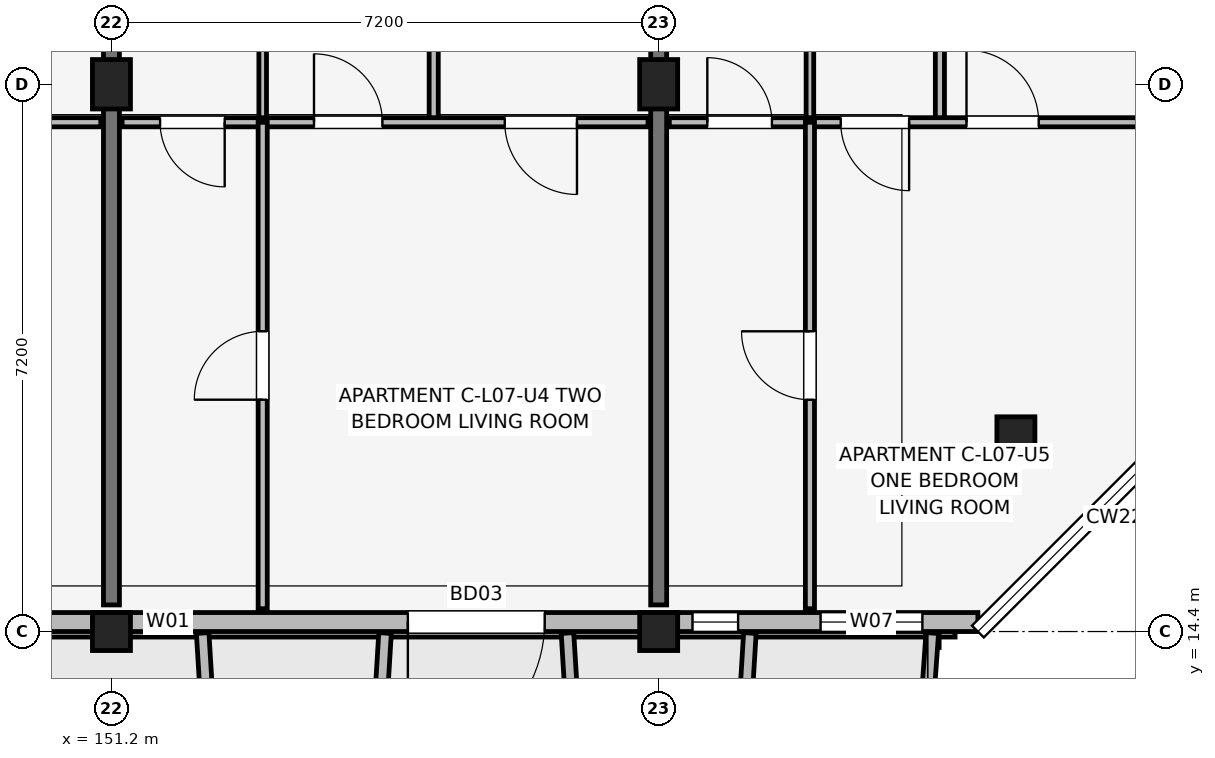
"""IFC4 building model, lengths in metres.
Left out: names, types, materials, properties, quantities, classifications, styles, units other than length and angle.
Written with IfcOpenShell. Run it as: python <this file> out.ifc"""

import sys

from ifc_helpers import new_model, si_unit, direction, frame, frame_2d, origin, origin_2d, place, context, subcontext, project, spatial, rectangle, extrude, element, fill, save


model = new_model("IFC4")
c1 = context("Model", 3, precision=1e-05, world=origin(), true_north=direction((0.0, 1.0)))
c2 = subcontext(c1, "Body", "Model", "MODEL_VIEW")
j1 = project(units=[si_unit("LENGTHUNIT", "METRE"), si_unit("PLANEANGLEUNIT", "RADIAN")], contexts=[c1])
p1 = place(None, origin())
s1 = spatial("IfcSite", under=j1, at=p1, CompositionType="ELEMENT")
p2 = place(p1, origin())
s2 = spatial("IfcBuilding", under=s1, at=p2, CompositionType="ELEMENT")
p3 = place(p2, frame((0.0, 0.0, 24.45)))
s3 = spatial("IfcBuildingStorey", under=s2, at=p3, CompositionType="ELEMENT", Elevation=24.45)
p4 = place(p3, frame((151.2, 14.4, 0.0), z_axis=(0.0, 0.0, 1.0), x_axis=(1.0, 0.0, 0.0)))
e1 = element("IfcColumn", 1, at=p4, inside=s3, PredefinedType="COLUMN", context=c2, shape_type="SweptSolid", body=[
    extrude(rectangle(XDim=0.5, YDim=0.5, at=origin_2d()), origin(), (0.0, 0.0, 1.0), 3.15),
])
p5 = place(p3, frame((151.2, 21.6, 0.0), z_axis=(0.0, 0.0, 1.0), x_axis=(1.0, 0.0, 0.0)))
e2 = element("IfcColumn", 2, at=p5, inside=s3, PredefinedType="COLUMN", context=c2, shape_type="SweptSolid", body=[
    extrude(rectangle(XDim=0.5, YDim=0.65, at=origin_2d()), origin(), (0.0, 0.0, 1.0), 3.15),
])
p6 = place(p3, frame((158.4, 14.4, 0.0), z_axis=(0.0, 0.0, 1.0), x_axis=(1.0, 0.0, 0.0)))
e3 = element("IfcColumn", 3, at=p6, inside=s3, PredefinedType="COLUMN", context=c2, shape_type="SweptSolid", body=[
    extrude(rectangle(XDim=0.5, YDim=0.5, at=origin_2d()), origin(), (0.0, 0.0, 1.0), 3.15),
])
for number, where, z_axis, x_axis in (
    (4, (158.4, 21.6, 0.0), (0.0, 0.0, 1.0), (1.0, 0.0, 0.0)),
    (5, (163.1, 16.9, 0.0), (0.0, 0.0, 1.0), (1.0, 0.0, 0.0)),
):
    element("IfcColumn", number, at=place(p3, frame(where, z_axis=z_axis, x_axis=x_axis)), inside=s3, PredefinedType="COLUMN", context=c2, shape_type="SweptSolid", body=[
        extrude(rectangle(XDim=0.5, YDim=0.65, at=origin_2d()), origin(), (0.0, 0.0, 1.0), 3.15),
    ])
for number, where, z_axis, x_axis in (
    (6, (151.2, 14.75, 0.0), (0.0, 0.0, 1.0), (0.0, 1.0, 0.0)),
    (7, (158.4, 14.75, 0.0), (0.0, 0.0, 1.0), (0.0, 1.0, 0.0)),
):
    element("IfcWall", number, at=place(p3, frame(where, z_axis=z_axis, x_axis=x_axis)), inside=s3, PredefinedType="SHEAR", context=c2, shape_type="SweptSolid", body=[
        extrude(rectangle(XDim=9.4, YDim=0.21, at=frame_2d((4.7, 0.0))), origin(), (0.0, 0.0, 1.0), 3.15),
    ])
p7 = place(p3, frame((132.6, 14.525, 0.0), z_axis=(0.0, 0.0, 1.0), x_axis=(1.0, 0.0, 0.0)))
e8 = element("IfcWall", 8, at=p7, inside=s3, PredefinedType="SOLIDWALL", context=c2, shape_type="SweptSolid", body=[
    extrude(rectangle(XDim=30.0, YDim=0.25, at=frame_2d((15.0, 0.0))), origin(), (0.0, 0.0, 1.0), 2.43),
])
p8 = place(p7, frame((9.75, 0.0, 0.0), z_axis=(0.0, 0.0, 1.0), x_axis=(-1.0, 0.0, 0.0)))
e9 = element("IfcOpeningElement", 9, at=p8, cuts=e8, PredefinedType="OPENING", context=c2, shape_type="SweptSolid", body=[
    extrude(rectangle(XDim=1.5, YDim=2.15, at=frame_2d((0.75, 1.075))), frame((0.0, 0.135, 0.0), z_axis=(0.0, -1.0, 0.0), x_axis=(1.0, 0.0, 0.0)), (0.0, 0.0, 1.0), 0.27),
])
p9 = place(p7, frame((24.3, 0.0, 0.0), z_axis=(0.0, 0.0, 1.0), x_axis=(-1.0, 0.0, 0.0)))
e10 = element("IfcOpeningElement", 10, at=p9, cuts=e8, PredefinedType="OPENING", context=c2, shape_type="SweptSolid", body=[
    extrude(rectangle(XDim=1.8, YDim=2.15, at=frame_2d((0.9, 1.075))), frame((0.0, 0.135, 0.0), z_axis=(0.0, -1.0, 0.0), x_axis=(1.0, 0.0, 0.0)), (0.0, 0.0, 1.0), 0.27),
])
p10 = place(p7, frame((1.46, 0.0, 0.75)))
e11 = element("IfcOpeningElement", 11, at=p10, cuts=e8, PredefinedType="OPENING", context=c2, shape_type="SweptSolid", body=[
    extrude(rectangle(XDim=0.85, YDim=1.4, at=frame_2d((0.425, 0.7))), frame((0.0, 0.135, 0.0), z_axis=(0.0, -1.0, 0.0), x_axis=(1.0, 0.0, 0.0)), (0.0, 0.0, 1.0), 0.27),
])
p11 = place(p7, frame((12.725, 0.0, 0.67)))
e12 = element("IfcOpeningElement", 12, at=p11, cuts=e8, PredefinedType="OPENING", context=c2, shape_type="SweptSolid", body=[
    extrude(rectangle(XDim=2.15, YDim=1.65, at=frame_2d((1.075, 0.825))), frame((0.0, 0.135, 0.0), z_axis=(0.0, -1.0, 0.0), x_axis=(1.0, 0.0, 0.0)), (0.0, 0.0, 1.0), 0.27),
])
p12 = place(p7, frame((19.045, 0.0, 0.75)))
e13 = element("IfcOpeningElement", 13, at=p12, cuts=e8, PredefinedType="OPENING", context=c2, shape_type="SweptSolid", body=[
    extrude(rectangle(XDim=0.6, YDim=1.25, at=frame_2d((0.3, 0.625))), frame((0.0, 0.135, 0.0), z_axis=(0.0, -1.0, 0.0), x_axis=(1.0, 0.0, 0.0)), (0.0, 0.0, 1.0), 0.27),
])
p13 = place(p7, frame((26.245, 0.0, 0.75)))
e14 = element("IfcOpeningElement", 14, at=p13, cuts=e8, PredefinedType="OPENING", context=c2, shape_type="SweptSolid", body=[
    extrude(rectangle(XDim=0.6, YDim=1.25, at=frame_2d((0.3, 0.625))), frame((0.0, 0.135, 0.0), z_axis=(0.0, -1.0, 0.0), x_axis=(1.0, 0.0, 0.0)), (0.0, 0.0, 1.0), 0.27),
])
p14 = place(p7, frame((27.93, 0.0, 0.75)))
e15 = element("IfcOpeningElement", 15, at=p14, cuts=e8, PredefinedType="OPENING", context=c2, shape_type="SweptSolid", body=[
    extrude(rectangle(XDim=1.34, YDim=1.55, at=frame_2d((0.67, 0.775))), frame((0.0, 0.135, 0.0), z_axis=(0.0, -1.0, 0.0), x_axis=(1.0, 0.0, 0.0)), (0.0, 0.0, 1.0), 0.27),
])
for number, where, z_axis, x_axis in (
    (16, (152.4, 14.38, 0.0), (0.0, 0.0, 1.0), (0.061, -0.998, 0.0)),
    (17, (154.8, 14.38, 0.0), (0.0, 0.0, 1.0), (-0.061, -0.998, 0.0)),
    (18, (157.2, 14.38, 0.0), (0.0, 0.0, 1.0), (0.061, -0.998, 0.0)),
):
    element("IfcWall", number, at=place(p3, frame(where, z_axis=z_axis, x_axis=x_axis)), inside=s3, PredefinedType="ELEMENTEDWALL", context=c2, shape_type="SweptSolid", body=[
        extrude(rectangle(XDim=1.964, YDim=0.165, at=frame_2d((0.982, 0.0))), origin(), (0.0, 0.0, 1.0), 2.53),
    ])
p15 = place(p3, frame((159.6, 14.38, 0.0), z_axis=(0.0, 0.0, 1.0), x_axis=(-0.061170732449, -0.998127317276, 0.0)))
e19 = element("IfcWall", 19, at=p15, inside=s3, PredefinedType="ELEMENTEDWALL", context=c2, shape_type="SweptSolid", body=[
    extrude(rectangle(XDim=1.964, YDim=0.165, at=frame_2d((0.982, 0.0))), origin(), (0.0, 0.0, 1.0), 2.95),
])
p16 = place(p3, frame((162.0, 14.38, 0.0), z_axis=(0.0, 0.0, 1.0), x_axis=(-0.071194071069, -0.997462482625, 0.0)))
e20 = element("IfcWall", 20, at=p16, inside=s3, PredefinedType="ELEMENTEDWALL", context=c2, shape_type="SweptSolid", body=[
    extrude(rectangle(XDim=1.965, YDim=0.165, at=frame_2d((0.982, 0.0))), origin(), (0.0, 0.0, 1.0), 2.95),
])
p17 = place(p3, frame((144.14, 21.1, 0.0), z_axis=(0.0, 0.0, 1.0), x_axis=(1.0, 0.0, 0.0)))
e21 = element("IfcWall", 21, at=p17, inside=s3, PredefinedType="PARTITIONING", context=c2, shape_type="SweptSolid", body=[
    extrude(rectangle(XDim=6.92, YDim=0.12, at=frame_2d((3.46, 0.0))), origin(), (0.0, 0.0, 1.0), 2.38),
])
p18 = place(p17, frame((1.35, 0.0, 0.0), z_axis=(0.0, 0.0, 1.0), x_axis=(-1.0, 0.0, 0.0)))
e22 = element("IfcOpeningElement", 22, at=p18, cuts=e21, PredefinedType="OPENING", context=c2, shape_type="SweptSolid", body=[
    extrude(rectangle(XDim=0.85, YDim=2.08, at=frame_2d((0.425, 1.04))), frame((0.0, 0.07, 0.0), z_axis=(0.0, -1.0, 0.0), x_axis=(1.0, 0.0, 0.0)), (0.0, 0.0, 1.0), 0.14),
])
p19 = place(p17, frame((2.375, 0.0, 0.0)))
e23 = element("IfcOpeningElement", 23, at=p19, cuts=e21, PredefinedType="OPENING", context=c2, shape_type="SweptSolid", body=[
    extrude(rectangle(XDim=0.9, YDim=2.08, at=frame_2d((0.45, 1.04))), frame((0.0, 0.07, 0.0), z_axis=(0.0, -1.0, 0.0), x_axis=(1.0, 0.0, 0.0)), (0.0, 0.0, 1.0), 0.14),
])
p20 = place(p17, frame((5.835, 0.0, 0.0), z_axis=(0.0, 0.0, 1.0), x_axis=(-1.0, 0.0, 0.0)))
e24 = element("IfcOpeningElement", 24, at=p20, cuts=e21, PredefinedType="OPENING", context=c2, shape_type="SweptSolid", body=[
    extrude(rectangle(XDim=0.95, YDim=2.08, at=frame_2d((0.475, 1.04))), frame((0.0, 0.07, 0.0), z_axis=(0.0, -1.0, 0.0), x_axis=(1.0, 0.0, 0.0)), (0.0, 0.0, 1.0), 0.14),
])
p21 = place(p3, frame((153.19, 21.1, 0.0), z_axis=(0.0, 0.0, 1.0), x_axis=(0.0, 1.0, 0.0)))
e25 = element("IfcWall", 25, at=p21, inside=s3, PredefinedType="PARTITIONING", context=c2, shape_type="SweptSolid", body=[
    extrude(rectangle(XDim=3.2, YDim=0.1, at=frame_2d((1.6, 0.0))), origin(), (0.0, 0.0, 1.0), 2.38),
])
p22 = place(p3, frame((155.44, 21.1, 0.0), z_axis=(0.0, 0.0, 1.0), x_axis=(0.0, 1.0, 0.0)))
e26 = element("IfcWall", 26, at=p22, inside=s3, PredefinedType="PARTITIONING", context=c2, shape_type="SweptSolid", body=[
    extrude(rectangle(XDim=3.2, YDim=0.12, at=frame_2d((1.6, 0.0))), origin(), (0.0, 0.0, 1.0), 2.38),
])
p23 = place(p3, frame((151.34, 21.1, 0.0), z_axis=(0.0, 0.0, 1.0), x_axis=(1.0, 0.0, 0.0)))
e27 = element("IfcWall", 27, at=p23, inside=s3, PredefinedType="PARTITIONING", context=c2, shape_type="SweptSolid", body=[
    extrude(rectangle(XDim=6.92, YDim=0.12, at=frame_2d((3.46, 0.0))), origin(), (0.0, 0.0, 1.0), 2.38),
])
p24 = place(p23, frame((1.35, 0.0, 0.0), z_axis=(0.0, 0.0, 1.0), x_axis=(-1.0, 0.0, 0.0)))
e28 = element("IfcOpeningElement", 28, at=p24, cuts=e27, PredefinedType="OPENING", context=c2, shape_type="SweptSolid", body=[
    extrude(rectangle(XDim=0.85, YDim=2.08, at=frame_2d((0.425, 1.04))), frame((0.0, 0.07, 0.0), z_axis=(0.0, -1.0, 0.0), x_axis=(1.0, 0.0, 0.0)), (0.0, 0.0, 1.0), 0.14),
])
p25 = place(p23, frame((2.525, 0.0, 0.0)))
e29 = element("IfcOpeningElement", 29, at=p25, cuts=e27, PredefinedType="OPENING", context=c2, shape_type="SweptSolid", body=[
    extrude(rectangle(XDim=0.9, YDim=2.08, at=frame_2d((0.45, 1.04))), frame((0.0, 0.07, 0.0), z_axis=(0.0, -1.0, 0.0), x_axis=(1.0, 0.0, 0.0)), (0.0, 0.0, 1.0), 0.14),
])
p26 = place(p23, frame((5.985, 0.0, 0.0), z_axis=(0.0, 0.0, 1.0), x_axis=(-1.0, 0.0, 0.0)))
e30 = element("IfcOpeningElement", 30, at=p26, cuts=e27, PredefinedType="OPENING", context=c2, shape_type="SweptSolid", body=[
    extrude(rectangle(XDim=0.95, YDim=2.08, at=frame_2d((0.475, 1.04))), frame((0.0, 0.07, 0.0), z_axis=(0.0, -1.0, 0.0), x_axis=(1.0, 0.0, 0.0)), (0.0, 0.0, 1.0), 0.14),
])
p27 = place(p3, frame((153.19, 14.7, 0.0), z_axis=(0.0, 0.0, 1.0), x_axis=(0.0, 1.0, 0.0)))
e31 = element("IfcWall", 31, at=p27, inside=s3, PredefinedType="PARTITIONING", context=c2, shape_type="SweptSolid", body=[
    extrude(rectangle(XDim=6.4, YDim=0.12, at=frame_2d((3.2, 0.0))), origin(), (0.0, 0.0, 1.0), 2.38),
])
p28 = place(p27, frame((2.75, 0.0, 0.0)))
e32 = element("IfcOpeningElement", 32, at=p28, cuts=e31, PredefinedType="OPENING", context=c2, shape_type="SweptSolid", body=[
    extrude(rectangle(XDim=0.9, YDim=2.08, at=frame_2d((0.45, 1.04))), frame((0.0, 0.07, 0.0), z_axis=(0.0, -1.0, 0.0), x_axis=(1.0, 0.0, 0.0)), (0.0, 0.0, 1.0), 0.14),
])
p29 = place(p3, frame((160.39, 21.1, 0.0), z_axis=(0.0, 0.0, 1.0), x_axis=(0.0, 1.0, 0.0)))
e33 = element("IfcWall", 33, at=p29, inside=s3, PredefinedType="PARTITIONING", context=c2, shape_type="SweptSolid", body=[
    extrude(rectangle(XDim=3.2, YDim=0.1, at=frame_2d((1.6, 0.0))), origin(), (0.0, 0.0, 1.0), 2.38),
])
p30 = place(p3, frame((162.1, 21.1, 0.0), z_axis=(0.0, 0.0, 1.0), x_axis=(0.0, 1.0, 0.0)))
e34 = element("IfcWall", 34, at=p30, inside=s3, PredefinedType="PARTITIONING", context=c2, shape_type="SweptSolid", body=[
    extrude(rectangle(XDim=3.2, YDim=0.12, at=frame_2d((1.6, 0.0))), origin(), (0.0, 0.0, 1.0), 2.38),
])
p31 = place(p3, frame((158.54, 21.1, 0.0), z_axis=(0.0, 0.0, 1.0), x_axis=(1.0, 0.0, 0.0)))
e35 = element("IfcWall", 35, at=p31, inside=s3, PredefinedType="PARTITIONING", context=c2, shape_type="SweptSolid", body=[
    extrude(rectangle(XDim=6.92, YDim=0.12, at=frame_2d((3.46, 0.0))), origin(), (0.0, 0.0, 1.0), 2.38),
])
p32 = place(p31, frame((0.5, 0.0, 0.0)))
e36 = element("IfcOpeningElement", 36, at=p32, cuts=e35, PredefinedType="OPENING", context=c2, shape_type="SweptSolid", body=[
    extrude(rectangle(XDim=0.85, YDim=2.08, at=frame_2d((0.425, 1.04))), frame((0.0, 0.07, 0.0), z_axis=(0.0, -1.0, 0.0), x_axis=(1.0, 0.0, 0.0)), (0.0, 0.0, 1.0), 0.14),
])
p33 = place(p31, frame((3.155, 0.0, 0.0), z_axis=(0.0, 0.0, 1.0), x_axis=(-1.0, 0.0, 0.0)))
e37 = element("IfcOpeningElement", 37, at=p33, cuts=e35, PredefinedType="OPENING", context=c2, shape_type="SweptSolid", body=[
    extrude(rectangle(XDim=0.9, YDim=2.08, at=frame_2d((0.45, 1.04))), frame((0.0, 0.07, 0.0), z_axis=(0.0, -1.0, 0.0), x_axis=(1.0, 0.0, 0.0)), (0.0, 0.0, 1.0), 0.14),
])
p34 = place(p31, frame((3.91, 0.0, 0.0)))
e38 = element("IfcOpeningElement", 38, at=p34, cuts=e35, PredefinedType="OPENING", context=c2, shape_type="SweptSolid", body=[
    extrude(rectangle(XDim=0.95, YDim=2.08, at=frame_2d((0.475, 1.04))), frame((0.0, 0.07, 0.0), z_axis=(0.0, -1.0, 0.0), x_axis=(1.0, 0.0, 0.0)), (0.0, 0.0, 1.0), 0.14),
])
p35 = place(p3, frame((160.39, 14.7, 0.0), z_axis=(0.0, 0.0, 1.0), x_axis=(0.0, 1.0, 0.0)))
e39 = element("IfcWall", 39, at=p35, inside=s3, PredefinedType="PARTITIONING", context=c2, shape_type="SweptSolid", body=[
    extrude(rectangle(XDim=6.4, YDim=0.12, at=frame_2d((3.2, 0.0))), origin(), (0.0, 0.0, 1.0), 2.38),
])
p36 = place(p35, frame((2.75, 0.0, 0.0)))
e40 = element("IfcOpeningElement", 40, at=p36, cuts=e39, PredefinedType="OPENING", context=c2, shape_type="SweptSolid", body=[
    extrude(rectangle(XDim=0.9, YDim=2.08, at=frame_2d((0.45, 1.04))), frame((0.0, 0.07, 0.0), z_axis=(0.0, -1.0, 0.0), x_axis=(1.0, 0.0, 0.0)), (0.0, 0.0, 1.0), 0.14),
])
p37 = place(p9, origin())
e41 = element("IfcDoor", 41, at=p37, inside=s3, OperationType="SINGLE_SWING_LEFT", PredefinedType="DOOR", context=c2, shape_type="SweptSolid", body=[
    extrude(rectangle(XDim=1.8, YDim=2.15, at=frame_2d((0.9, 1.075))), frame((0.0, 0.025, 0.0), z_axis=(0.0, -1.0, 0.0), x_axis=(1.0, 0.0, 0.0)), (0.0, 0.0, 1.0), 0.05),
])
fill(e10, e41)
p38 = place(p12, origin())
e42 = element("IfcWindow", 42, at=p38, inside=s3, PartitioningType="SINGLE_PANEL", PredefinedType="WINDOW", context=c2, shape_type="SweptSolid", body=[
    extrude(rectangle(XDim=0.6, YDim=1.25, at=frame_2d((0.3, 0.625))), frame((0.0, 0.03, 0.0), z_axis=(0.0, -1.0, 0.0), x_axis=(1.0, 0.0, 0.0)), (0.0, 0.0, 1.0), 0.06),
])
fill(e13, e42)
p39 = place(p13, origin())
e43 = element("IfcWindow", 43, at=p39, inside=s3, PartitioningType="SINGLE_PANEL", PredefinedType="WINDOW", context=c2, shape_type="SweptSolid", body=[
    extrude(rectangle(XDim=0.6, YDim=1.25, at=frame_2d((0.3, 0.625))), frame((0.0, 0.03, 0.0), z_axis=(0.0, -1.0, 0.0), x_axis=(1.0, 0.0, 0.0)), (0.0, 0.0, 1.0), 0.06),
])
fill(e14, e43)
p40 = place(p14, origin())
e44 = element("IfcWindow", 44, at=p40, inside=s3, PartitioningType="SINGLE_PANEL", PredefinedType="WINDOW", context=c2, shape_type="SweptSolid", body=[
    extrude(rectangle(XDim=1.34, YDim=1.55, at=frame_2d((0.67, 0.775))), frame((0.0, 0.03, 0.0), z_axis=(0.0, -1.0, 0.0), x_axis=(1.0, 0.0, 0.0)), (0.0, 0.0, 1.0), 0.06),
])
fill(e15, e44)
p41 = place(p24, origin())
e45 = element("IfcDoor", 45, at=p41, inside=s3, OperationType="SINGLE_SWING_RIGHT", PredefinedType="DOOR", context=c2, shape_type="SweptSolid", body=[
    extrude(rectangle(XDim=0.85, YDim=2.08, at=frame_2d((0.425, 1.04))), frame((0.0, 0.025, 0.0), z_axis=(0.0, -1.0, 0.0), x_axis=(1.0, 0.0, 0.0)), (0.0, 0.0, 1.0), 0.05),
])
fill(e28, e45)
p42 = place(p25, origin())
e46 = element("IfcDoor", 46, at=p42, inside=s3, OperationType="SINGLE_SWING_LEFT", PredefinedType="DOOR", context=c2, shape_type="SweptSolid", body=[
    extrude(rectangle(XDim=0.9, YDim=2.08, at=frame_2d((0.45, 1.04))), frame((0.0, 0.025, 0.0), z_axis=(0.0, -1.0, 0.0), x_axis=(1.0, 0.0, 0.0)), (0.0, 0.0, 1.0), 0.05),
])
fill(e29, e46)
p43 = place(p26, origin())
e47 = element("IfcDoor", 47, at=p43, inside=s3, OperationType="SINGLE_SWING_RIGHT", PredefinedType="DOOR", context=c2, shape_type="SweptSolid", body=[
    extrude(rectangle(XDim=0.95, YDim=2.08, at=frame_2d((0.475, 1.04))), frame((0.0, 0.025, 0.0), z_axis=(0.0, -1.0, 0.0), x_axis=(1.0, 0.0, 0.0)), (0.0, 0.0, 1.0), 0.05),
])
fill(e30, e47)
p44 = place(p28, origin())
e48 = element("IfcDoor", 48, at=p44, inside=s3, OperationType="SINGLE_SWING_LEFT", PredefinedType="DOOR", context=c2, shape_type="SweptSolid", body=[
    extrude(rectangle(XDim=0.9, YDim=2.08, at=frame_2d((0.45, 1.04))), frame((0.0, 0.025, 0.0), z_axis=(0.0, -1.0, 0.0), x_axis=(1.0, 0.0, 0.0)), (0.0, 0.0, 1.0), 0.05),
])
fill(e32, e48)
p45 = place(p32, origin())
e49 = element("IfcDoor", 49, at=p45, inside=s3, OperationType="SINGLE_SWING_LEFT", PredefinedType="DOOR", context=c2, shape_type="SweptSolid", body=[
    extrude(rectangle(XDim=0.85, YDim=2.08, at=frame_2d((0.425, 1.04))), frame((0.0, 0.025, 0.0), z_axis=(0.0, -1.0, 0.0), x_axis=(1.0, 0.0, 0.0)), (0.0, 0.0, 1.0), 0.05),
])
fill(e36, e49)
p46 = place(p33, origin())
e50 = element("IfcDoor", 50, at=p46, inside=s3, OperationType="SINGLE_SWING_RIGHT", PredefinedType="DOOR", context=c2, shape_type="SweptSolid", body=[
    extrude(rectangle(XDim=0.9, YDim=2.08, at=frame_2d((0.45, 1.04))), frame((0.0, 0.025, 0.0), z_axis=(0.0, -1.0, 0.0), x_axis=(1.0, 0.0, 0.0)), (0.0, 0.0, 1.0), 0.05),
])
fill(e37, e50)
p47 = place(p34, origin())
e51 = element("IfcDoor", 51, at=p47, inside=s3, OperationType="SINGLE_SWING_LEFT", PredefinedType="DOOR", context=c2, shape_type="SweptSolid", body=[
    extrude(rectangle(XDim=0.95, YDim=2.08, at=frame_2d((0.475, 1.04))), frame((0.0, 0.025, 0.0), z_axis=(0.0, -1.0, 0.0), x_axis=(1.0, 0.0, 0.0)), (0.0, 0.0, 1.0), 0.05),
])
fill(e38, e51)
p48 = place(p36, origin())
e52 = element("IfcDoor", 52, at=p48, inside=s3, OperationType="SINGLE_SWING_RIGHT", PredefinedType="DOOR", context=c2, shape_type="SweptSolid", body=[
    extrude(rectangle(XDim=0.9, YDim=2.08, at=frame_2d((0.45, 1.04))), frame((0.0, 0.025, 0.0), z_axis=(0.0, -1.0, 0.0), x_axis=(1.0, 0.0, 0.0)), (0.0, 0.0, 1.0), 0.05),
])
fill(e40, e52)
save(model, sys.argv[1])
